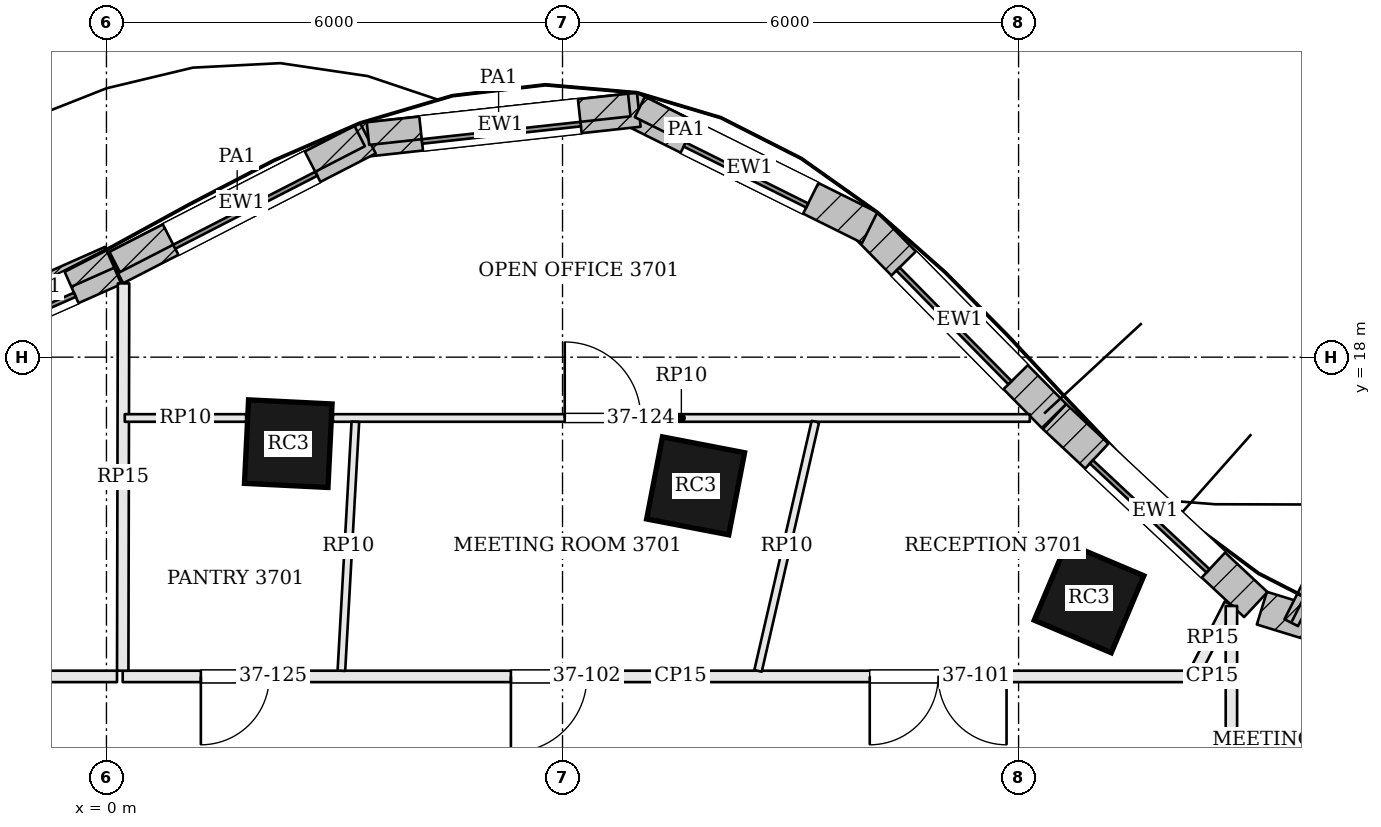
"""IFC4 building model, lengths in metres.
Left out: names, types, materials, properties, quantities, classifications, styles, units other than length and angle.
Written with IfcOpenShell. Run it as: python <this file> out.ifc"""

import sys

from ifc_helpers import new_model, si_unit, direction, frame, frame_2d, origin, origin_2d, place, context, subcontext, project, spatial, rectangle, extrude, element, fill, save


model = new_model("IFC4")
c1 = context("Model", 3, precision=1e-05, world=origin(), true_north=direction((0.0, 1.0)))
c2 = subcontext(c1, "Body", "Model", "MODEL_VIEW")
j1 = project(units=[si_unit("LENGTHUNIT", "METRE"), si_unit("PLANEANGLEUNIT", "RADIAN")], contexts=[c1])
p1 = place(None, origin())
s1 = spatial("IfcSite", under=j1, at=p1, CompositionType="ELEMENT")
p2 = place(p1, origin())
s2 = spatial("IfcBuilding", under=s1, at=p2, CompositionType="ELEMENT")
p3 = place(p2, frame((0.0, 0.0, 153.9)))
s3 = spatial("IfcBuildingStorey", under=s2, at=p3, CompositionType="ELEMENT", Elevation=153.9)
for number, where, z_axis, x_axis in (
    (1, (12.927, 14.832, 0.0), (0.0, 0.0, 1.0), (-0.921, 0.389, 0.0)),
    (2, (7.751, 16.307, 0.0), (0.0, 0.0, 1.0), (-0.982, 0.189, 0.0)),
    (3, (2.392, 16.862, 0.0), (0.0, 0.0, 1.0), (-0.999, 0.049, 0.0)),
):
    element("IfcColumn", number, at=place(p3, frame(where, z_axis=z_axis, x_axis=x_axis)), inside=s3, PredefinedType="COLUMN", context=c2, shape_type="SweptSolid", body=[
        extrude(rectangle(XDim=1.1, YDim=1.1, at=origin_2d()), origin(), (0.0, 0.0, 1.0), 3.9),
    ])
p4 = place(p3, frame((18.958, 13.542, 0.0), z_axis=(0.0, 0.0, 1.0), x_axis=(-0.955792437529, 0.294042201668, 0.0)))
e4 = element("IfcWall", 4, at=p4, inside=s3, PredefinedType="SOLIDWALL", context=c2, shape_type="SweptSolid", body=[
    extrude(rectangle(XDim=3.931, YDim=0.45, at=frame_2d((1.965, 0.0))), origin(), (0.0, 0.0, 1.0), 3.7),
])
p5 = place(p4, frame((0.915, 0.0, 0.9)))
e5 = element("IfcOpeningElement", 5, at=p5, cuts=e4, PredefinedType="OPENING", context=c2, shape_type="SweptSolid", body=[
    extrude(rectangle(XDim=2.1, YDim=2.3, at=frame_2d((1.05, 1.15))), frame((0.0, 0.235, 0.0), z_axis=(0.0, -1.0, 0.0), x_axis=(1.0, 0.0, 0.0)), (0.0, 0.0, 1.0), 0.47),
])
p6 = place(p3, frame((15.121, 14.745, 0.0), z_axis=(0.0, 0.0, 1.0), x_axis=(-0.730618259172, 0.68278617397, 0.0)))
e6 = element("IfcWall", 6, at=p6, inside=s3, PredefinedType="SOLIDWALL", context=c2, shape_type="SweptSolid", body=[
    extrude(rectangle(XDim=3.624, YDim=0.45, at=frame_2d((1.812, 0.0))), origin(), (0.0, 0.0, 1.0), 3.7),
])
p7 = place(p6, frame((0.762, 0.0, 0.9)))
e7 = element("IfcOpeningElement", 7, at=p7, cuts=e6, PredefinedType="OPENING", context=c2, shape_type="SweptSolid", body=[
    extrude(rectangle(XDim=2.1, YDim=2.3, at=frame_2d((1.05, 1.15))), frame((0.0, 0.235, 0.0), z_axis=(0.0, -1.0, 0.0), x_axis=(1.0, 0.0, 0.0)), (0.0, 0.0, 1.0), 0.47),
])
p8 = place(p3, frame((12.466, 17.226, 0.0), z_axis=(0.0, 0.0, 1.0), x_axis=(-0.701875966769, 0.712299183821, 0.0)))
e8 = element("IfcWall", 8, at=p8, inside=s3, PredefinedType="SOLIDWALL", context=c2, shape_type="SweptSolid", body=[
    extrude(rectangle(XDim=3.537, YDim=0.45, at=frame_2d((1.769, 0.0))), origin(), (0.0, 0.0, 1.0), 3.7),
])
p9 = place(p8, frame((0.718, 0.0, 0.9)))
e9 = element("IfcOpeningElement", 9, at=p9, cuts=e8, PredefinedType="OPENING", context=c2, shape_type="SweptSolid", body=[
    extrude(rectangle(XDim=2.1, YDim=2.3, at=frame_2d((1.05, 1.15))), frame((0.0, 0.235, 0.0), z_axis=(0.0, -1.0, 0.0), x_axis=(1.0, 0.0, 0.0)), (0.0, 0.0, 1.0), 0.47),
])
p10 = place(p3, frame((10.042, 19.704, 0.0), z_axis=(0.0, 0.0, 1.0), x_axis=(-0.895268695224, 0.445526613517, 0.0)))
e10 = element("IfcWall", 10, at=p10, inside=s3, PredefinedType="SOLIDWALL", context=c2, shape_type="SweptSolid", body=[
    extrude(rectangle(XDim=3.533, YDim=0.45, at=frame_2d((1.767, 0.0))), origin(), (0.0, 0.0, 1.0), 3.7),
])
p11 = place(p10, frame((0.866, 0.0, 0.9)))
e11 = element("IfcOpeningElement", 11, at=p11, cuts=e10, PredefinedType="OPENING", context=c2, shape_type="SweptSolid", body=[
    extrude(rectangle(XDim=1.8, YDim=2.3, at=frame_2d((0.9, 1.15))), frame((0.0, 0.235, 0.0), z_axis=(0.0, -1.0, 0.0), x_axis=(1.0, 0.0, 0.0)), (0.0, 0.0, 1.0), 0.47),
])
p12 = place(p3, frame((7.003, 21.255, 0.0), z_axis=(0.0, 0.0, 1.0), x_axis=(-0.99407653264, -0.108682322638, 0.0)))
e12 = element("IfcWall", 12, at=p12, inside=s3, PredefinedType="SOLIDWALL", context=c2, shape_type="SweptSolid", body=[
    extrude(rectangle(XDim=3.662, YDim=0.45, at=frame_2d((1.831, 0.0))), origin(), (0.0, 0.0, 1.0), 3.7),
])
p13 = place(p12, frame((0.781, 0.0, 0.9)))
e13 = element("IfcOpeningElement", 13, at=p13, cuts=e12, PredefinedType="OPENING", context=c2, shape_type="SweptSolid", body=[
    extrude(rectangle(XDim=2.1, YDim=2.3, at=frame_2d((1.05, 1.15))), frame((0.0, 0.235, 0.0), z_axis=(0.0, -1.0, 0.0), x_axis=(1.0, 0.0, 0.0)), (0.0, 0.0, 1.0), 0.47),
])
p14 = place(p3, frame((3.44, 20.88, 0.0), z_axis=(0.0, 0.0, 1.0), x_axis=(-0.889471529144, -0.456990589446, 0.0)))
e14 = element("IfcWall", 14, at=p14, inside=s3, PredefinedType="SOLIDWALL", context=c2, shape_type="SweptSolid", body=[
    extrude(rectangle(XDim=3.735, YDim=0.45, at=frame_2d((1.868, 0.0))), origin(), (0.0, 0.0, 1.0), 3.7),
])
p15 = place(p14, frame((0.818, 0.0, 0.9)))
e15 = element("IfcOpeningElement", 15, at=p15, cuts=e14, PredefinedType="OPENING", context=c2, shape_type="SweptSolid", body=[
    extrude(rectangle(XDim=2.1, YDim=2.3, at=frame_2d((1.05, 1.15))), frame((0.0, 0.235, 0.0), z_axis=(0.0, -1.0, 0.0), x_axis=(1.0, 0.0, 0.0)), (0.0, 0.0, 1.0), 0.47),
])
p16 = place(p3, frame((0.105, 19.167, 0.0), z_axis=(0.0, 0.0, 1.0), x_axis=(-0.91414046241, -0.405397601109, 0.0)))
e16 = element("IfcWall", 16, at=p16, inside=s3, PredefinedType="SOLIDWALL", context=c2, shape_type="SweptSolid", body=[
    extrude(rectangle(XDim=3.333, YDim=0.45, at=frame_2d((1.667, 0.0))), origin(), (0.0, 0.0, 1.0), 3.7),
])
p17 = place(p16, frame((0.617, 0.0, 0.9)))
e17 = element("IfcOpeningElement", 17, at=p17, cuts=e16, PredefinedType="OPENING", context=c2, shape_type="SweptSolid", body=[
    extrude(rectangle(XDim=2.1, YDim=2.3, at=frame_2d((1.05, 1.15))), frame((0.0, 0.235, 0.0), z_axis=(0.0, -1.0, 0.0), x_axis=(1.0, 0.0, 0.0)), (0.0, 0.0, 1.0), 0.47),
])
p18 = place(p3, frame((15.587, 14.507, 0.0), z_axis=(0.0, 0.0, 1.0), x_axis=(0.452117231361, 0.89195852432, 0.0)))
e18 = element("IfcWall", 18, at=p18, inside=s3, PredefinedType="SOLIDWALL", context=c2, shape_type="SweptSolid", body=[
    extrude(rectangle(XDim=1.75, YDim=0.2, at=frame_2d((0.875, 0.0))), origin(), (0.0, 0.0, 1.0), 3.7),
])
p19 = place(p3, frame((8.237, 20.686, 3.9), z_axis=(0.0, 0.0, 1.0), x_axis=(-0.895321970712, 0.445419542409, 0.0)))
e19 = element("IfcWall", 19, at=p19, inside=s3, PredefinedType="PARAPET", context=c2, shape_type="SweptSolid", body=[
    extrude(rectangle(XDim=1.362, YDim=0.3, at=frame_2d((0.681, 0.0))), origin(), (0.0, 0.0, 1.0), 1.1),
])
p20 = place(p3, frame((6.878, 21.317, 3.9), z_axis=(0.0, 0.0, 1.0), x_axis=(-0.994072526282, -0.108718961045, 0.0)))
e20 = element("IfcWall", 20, at=p20, inside=s3, PredefinedType="PARAPET", context=c2, shape_type="SweptSolid", body=[
    extrude(rectangle(XDim=3.458, YDim=0.3, at=frame_2d((1.729, 0.0))), origin(), (0.0, 0.0, 1.0), 1.1),
])
p21 = place(p3, frame((3.332, 20.908, 3.9), z_axis=(0.0, 0.0, 1.0), x_axis=(-0.889469340024, -0.456994850252, 0.0)))
e21 = element("IfcWall", 21, at=p21, inside=s3, PredefinedType="PARAPET", context=c2, shape_type="SweptSolid", body=[
    extrude(rectangle(XDim=3.624, YDim=0.3, at=frame_2d((1.812, 0.0))), origin(), (0.0, 0.0, 1.0), 1.1),
])
p22 = place(p3, frame((0.042, 19.314, 3.9), z_axis=(0.0, 0.0, 1.0), x_axis=(-0.914153218407, -0.405368836094, 0.0)))
e22 = element("IfcWall", 22, at=p22, inside=s3, PredefinedType="PARAPET", context=c2, shape_type="SweptSolid", body=[
    extrude(rectangle(XDim=1.943, YDim=0.3, at=frame_2d((0.971, 0.0))), origin(), (0.0, 0.0, 1.0), 1.1),
])
p23 = place(p3, frame((14.292, 13.8, 0.0), z_axis=(0.0, 0.0, 1.0), x_axis=(-1.0, 0.0, 0.0)))
e23 = element("IfcWall", 23, at=p23, inside=s3, PredefinedType="PARTITIONING", context=c2, shape_type="SweptSolid", body=[
    extrude(rectangle(XDim=14.078, YDim=0.15, at=frame_2d((7.039, 0.0))), origin(), (0.0, 0.0, 1.0), 3.198),
])
p24 = place(p23, frame((2.45, 0.0, 0.0)))
e24 = element("IfcOpeningElement", 24, at=p24, cuts=e23, PredefinedType="OPENING", context=c2, shape_type="SweptSolid", body=[
    extrude(rectangle(XDim=1.8, YDim=2.1, at=frame_2d((0.9, 1.05))), frame((0.0, 0.085, 0.0), z_axis=(0.0, -1.0, 0.0), x_axis=(1.0, 0.0, 0.0)), (0.0, 0.0, 1.0), 0.17),
])
p25 = place(p23, frame((7.971, 0.0, 0.0)))
e25 = element("IfcOpeningElement", 25, at=p25, cuts=e23, PredefinedType="OPENING", context=c2, shape_type="SweptSolid", body=[
    extrude(rectangle(XDim=1.0, YDim=2.4, at=frame_2d((0.5, 1.2))), frame((0.0, 0.085, 0.0), z_axis=(0.0, -1.0, 0.0), x_axis=(1.0, 0.0, 0.0)), (0.0, 0.0, 1.0), 0.17),
])
p26 = place(p23, frame((12.15, 0.0, 0.0)))
e26 = element("IfcOpeningElement", 26, at=p26, cuts=e23, PredefinedType="OPENING", context=c2, shape_type="SweptSolid", body=[
    extrude(rectangle(XDim=0.9, YDim=2.1, at=frame_2d((0.45, 1.05))), frame((0.0, 0.085, 0.0), z_axis=(0.0, -1.0, 0.0), x_axis=(1.0, 0.0, 0.0)), (0.0, 0.0, 1.0), 0.17),
])
p27 = place(p3, frame((14.779, 14.751, 0.0), z_axis=(0.0, 0.0, 1.0), x_axis=(-0.45584263358, -0.890060387508, 0.0)))
e27 = element("IfcWall", 27, at=p27, inside=s3, PredefinedType="PARTITIONING", context=c2, shape_type="SweptSolid", body=[
    extrude(rectangle(XDim=0.993, YDim=0.15, at=frame_2d((0.497, 0.0))), origin(), (0.0, 0.0, 1.0), 3.198),
])
p28 = place(p3, frame((0.225, 18.97, 0.0), z_axis=(0.0, 0.0, 1.0), x_axis=(-0.002156096756, -0.999997675621, 0.0)))
e28 = element("IfcWall", 28, at=p28, inside=s3, PredefinedType="PARTITIONING", context=c2, shape_type="SweptSolid", body=[
    extrude(rectangle(XDim=5.095, YDim=0.15, at=frame_2d((2.548, 0.0))), origin(), (0.0, 0.0, 1.0), 3.198),
])
p29 = place(p3, frame((0.139, 13.8, 0.0), z_axis=(0.0, 0.0, 1.0), x_axis=(-1.0, 0.0, 0.0)))
e29 = element("IfcWall", 29, at=p29, inside=s3, PredefinedType="PARTITIONING", context=c2, shape_type="SweptSolid", body=[
    extrude(rectangle(XDim=14.939, YDim=0.15, at=frame_2d((7.469, 0.0))), origin(), (0.0, 0.0, 1.0), 3.198),
])
p30 = place(p29, frame((6.954, 0.0, 0.0)))
e30 = element("IfcOpeningElement", 30, at=p30, cuts=e29, PredefinedType="OPENING", context=c2, shape_type="SweptSolid", body=[
    extrude(rectangle(XDim=1.8, YDim=2.1, at=frame_2d((0.9, 1.05))), frame((0.0, 0.085, 0.0), z_axis=(0.0, -1.0, 0.0), x_axis=(1.0, 0.0, 0.0)), (0.0, 0.0, 1.0), 0.17),
])
p31 = place(p3, frame((14.8, 2.368, 0.0), z_axis=(0.0, 0.0, 1.0), x_axis=(0.0, 1.0, 0.0)))
e31 = element("IfcWall", 31, at=p31, inside=s3, PredefinedType="PARTITIONING", context=c2, shape_type="SweptSolid", body=[
    extrude(rectangle(XDim=12.359, YDim=0.15, at=frame_2d((6.18, 0.0))), origin(), (0.0, 0.0, 1.0), 3.198),
])
p32 = place(p31, frame((2.057, 0.0, 0.0)))
e32 = element("IfcOpeningElement", 32, at=p32, cuts=e31, PredefinedType="OPENING", context=c2, shape_type="SweptSolid", body=[
    extrude(rectangle(XDim=1.8, YDim=2.1, at=frame_2d((0.9, 1.05))), frame((0.0, 0.085, 0.0), z_axis=(0.0, -1.0, 0.0), x_axis=(1.0, 0.0, 0.0)), (0.0, 0.0, 1.0), 0.17),
])
p33 = place(p31, frame((8.465, 0.0, 0.0)))
e33 = element("IfcOpeningElement", 33, at=p33, cuts=e31, PredefinedType="OPENING", context=c2, shape_type="SweptSolid", body=[
    extrude(rectangle(XDim=1.0, YDim=2.4, at=frame_2d((0.5, 1.2))), frame((0.0, 0.085, 0.0), z_axis=(0.0, -1.0, 0.0), x_axis=(1.0, 0.0, 0.0)), (0.0, 0.0, 1.0), 0.17),
])
p34 = place(p3, frame((14.725, 13.8, 0.0), z_axis=(0.0, 0.0, 1.0), x_axis=(-1.0, 0.0, 0.0)))
e34 = element("IfcWall", 34, at=p34, inside=s3, PredefinedType="PARTITIONING", context=c2, shape_type="SweptSolid", body=[
    extrude(rectangle(XDim=0.358, YDim=0.15, at=frame_2d((0.179, 0.0))), origin(), (0.0, 0.0, 1.0), 3.198),
])
p35 = place(p3, frame((0.241, 17.2, 0.0), z_axis=(0.0, 0.0, 1.0), x_axis=(1.0, 0.0, 0.0)))
e35 = element("IfcWall", 35, at=p35, inside=s3, PredefinedType="PARTITIONING", context=c2, shape_type="SweptSolid", body=[
    extrude(rectangle(XDim=1.597, YDim=0.1, at=frame_2d((0.798, 0.0))), origin(), (0.0, 0.0, 1.0), 3.184),
])
p36 = place(p3, frame((2.979, 17.2, 0.0), z_axis=(0.0, 0.0, 1.0), x_axis=(1.0, 0.0, 0.0)))
e36 = element("IfcWall", 36, at=p36, inside=s3, PredefinedType="PARTITIONING", context=c2, shape_type="SweptSolid", body=[
    extrude(rectangle(XDim=9.168, YDim=0.1, at=frame_2d((4.584, 0.0))), origin(), (0.0, 0.0, 1.0), 3.184),
])
p37 = place(p36, frame((3.05, 0.0, 0.0)))
e37 = element("IfcOpeningElement", 37, at=p37, cuts=e36, PredefinedType="OPENING", context=c2, shape_type="SweptSolid", body=[
    extrude(rectangle(XDim=1.0, YDim=2.4, at=frame_2d((0.5, 1.2))), frame((0.0, 0.06, 0.0), z_axis=(0.0, -1.0, 0.0), x_axis=(1.0, 0.0, 0.0)), (0.0, 0.0, 1.0), 0.12),
])
p38 = place(p3, frame((8.573, 13.873, 0.0), z_axis=(0.0, 0.0, 1.0), x_axis=(0.224048430302, 0.974578011695, 0.0)))
e38 = element("IfcWall", 38, at=p38, inside=s3, PredefinedType="PARTITIONING", context=c2, shape_type="SweptSolid", body=[
    extrude(rectangle(XDim=3.364, YDim=0.1, at=frame_2d((1.682, 0.0))), origin(), (0.0, 0.0, 1.0), 3.184),
])
p39 = place(p3, frame((3.091, 13.875, 0.0), z_axis=(0.0, 0.0, 1.0), x_axis=(0.056042978235, 0.998428357265, 0.0)))
e39 = element("IfcWall", 39, at=p39, inside=s3, PredefinedType="PARTITIONING", context=c2, shape_type="SweptSolid", body=[
    extrude(rectangle(XDim=3.28, YDim=0.1, at=frame_2d((1.64, 0.0))), origin(), (0.0, 0.0, 1.0), 3.184),
])
p40 = place(p7, origin())
e40 = element("IfcWindow", 40, at=p40, inside=s3, PartitioningType="SINGLE_PANEL", PredefinedType="WINDOW", context=c2, shape_type="SweptSolid", body=[
    extrude(rectangle(XDim=2.1, YDim=2.3, at=frame_2d((1.05, 1.15))), frame((0.0, 0.135, 0.0), z_axis=(0.0, -1.0, 0.0), x_axis=(1.0, 0.0, 0.0)), (0.0, 0.0, 1.0), 0.06),
])
fill(e7, e40)
p41 = place(p9, origin())
e41 = element("IfcWindow", 41, at=p41, inside=s3, PartitioningType="SINGLE_PANEL", PredefinedType="WINDOW", context=c2, shape_type="SweptSolid", body=[
    extrude(rectangle(XDim=2.1, YDim=2.3, at=frame_2d((1.05, 1.15))), frame((0.0, 0.135, 0.0), z_axis=(0.0, -1.0, 0.0), x_axis=(1.0, 0.0, 0.0)), (0.0, 0.0, 1.0), 0.06),
])
fill(e9, e41)
p42 = place(p11, origin())
e42 = element("IfcWindow", 42, at=p42, inside=s3, PartitioningType="SINGLE_PANEL", PredefinedType="WINDOW", context=c2, shape_type="SweptSolid", body=[
    extrude(rectangle(XDim=1.8, YDim=2.3, at=frame_2d((0.9, 1.15))), frame((0.0, 0.135, 0.0), z_axis=(0.0, -1.0, 0.0), x_axis=(1.0, 0.0, 0.0)), (0.0, 0.0, 1.0), 0.06),
])
fill(e11, e42)
p43 = place(p13, origin())
e43 = element("IfcWindow", 43, at=p43, inside=s3, PartitioningType="SINGLE_PANEL", PredefinedType="WINDOW", context=c2, shape_type="SweptSolid", body=[
    extrude(rectangle(XDim=2.1, YDim=2.3, at=frame_2d((1.05, 1.15))), frame((0.0, 0.135, 0.0), z_axis=(0.0, -1.0, 0.0), x_axis=(1.0, 0.0, 0.0)), (0.0, 0.0, 1.0), 0.06),
])
fill(e13, e43)
p44 = place(p15, origin())
e44 = element("IfcWindow", 44, at=p44, inside=s3, PartitioningType="SINGLE_PANEL", PredefinedType="WINDOW", context=c2, shape_type="SweptSolid", body=[
    extrude(rectangle(XDim=2.1, YDim=2.3, at=frame_2d((1.05, 1.15))), frame((0.0, 0.135, 0.0), z_axis=(0.0, -1.0, 0.0), x_axis=(1.0, 0.0, 0.0)), (0.0, 0.0, 1.0), 0.06),
])
fill(e15, e44)
p45 = place(p17, origin())
e45 = element("IfcWindow", 45, at=p45, inside=s3, PartitioningType="SINGLE_PANEL", PredefinedType="WINDOW", context=c2, shape_type="SweptSolid", body=[
    extrude(rectangle(XDim=2.1, YDim=2.3, at=frame_2d((1.05, 1.15))), frame((0.0, 0.135, 0.0), z_axis=(0.0, -1.0, 0.0), x_axis=(1.0, 0.0, 0.0)), (0.0, 0.0, 1.0), 0.06),
])
fill(e17, e45)
p46 = place(p24, origin())
e46 = element("IfcDoor", 46, at=p46, inside=s3, OperationType="DOUBLE_DOOR_SINGLE_SWING", PredefinedType="DOOR", context=c2, shape_type="SweptSolid", body=[
    extrude(rectangle(XDim=1.8, YDim=2.1, at=frame_2d((0.9, 1.05))), frame((0.0, 0.025, 0.0), z_axis=(0.0, -1.0, 0.0), x_axis=(1.0, 0.0, 0.0)), (0.0, 0.0, 1.0), 0.05),
])
fill(e24, e46)
p47 = place(p25, origin())
e47 = element("IfcDoor", 47, at=p47, inside=s3, OperationType="SINGLE_SWING_RIGHT", PredefinedType="DOOR", context=c2, shape_type="SweptSolid", body=[
    extrude(rectangle(XDim=1.0, YDim=2.4, at=frame_2d((0.5, 1.2))), frame((0.0, 0.025, 0.0), z_axis=(0.0, -1.0, 0.0), x_axis=(1.0, 0.0, 0.0)), (0.0, 0.0, 1.0), 0.05),
])
fill(e25, e47)
p48 = place(p37, origin())
e48 = element("IfcDoor", 48, at=p48, inside=s3, OperationType="SINGLE_SWING_LEFT", PredefinedType="DOOR", context=c2, shape_type="SweptSolid", body=[
    extrude(rectangle(XDim=1.0, YDim=2.4, at=frame_2d((0.5, 1.2))), frame((0.0, 0.025, 0.0), z_axis=(0.0, -1.0, 0.0), x_axis=(1.0, 0.0, 0.0)), (0.0, 0.0, 1.0), 0.05),
])
fill(e37, e48)
p49 = place(p26, origin())
e49 = element("IfcDoor", 49, at=p49, inside=s3, OperationType="SINGLE_SWING_RIGHT", PredefinedType="DOOR", context=c2, shape_type="SweptSolid", body=[
    extrude(rectangle(XDim=0.9, YDim=2.1, at=frame_2d((0.45, 1.05))), frame((0.0, 0.025, 0.0), z_axis=(0.0, -1.0, 0.0), x_axis=(1.0, 0.0, 0.0)), (0.0, 0.0, 1.0), 0.05),
])
fill(e26, e49)
save(model, sys.argv[1])
